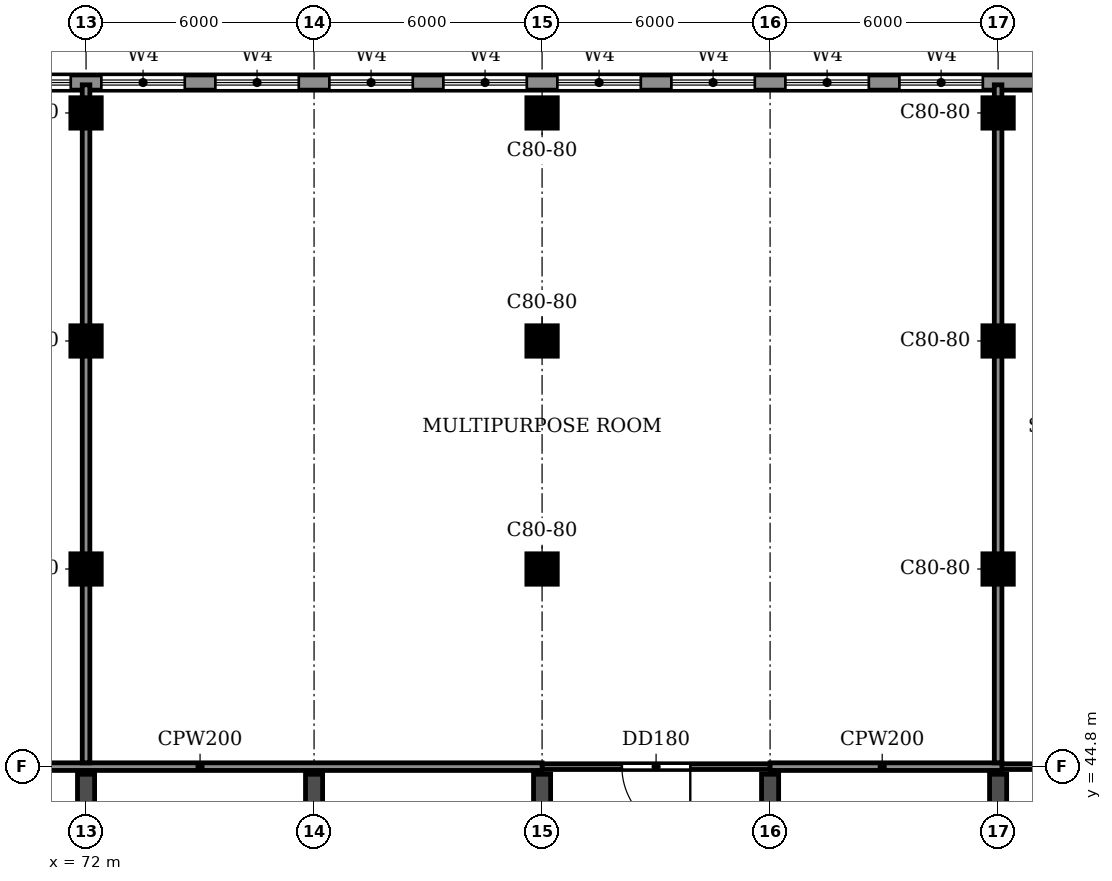
"""IFC4 building model, lengths in metres.
Left out: names, types, materials, properties, quantities, classifications, styles, units other than length and angle.
Written with IfcOpenShell. Run it as: python <this file> out.ifc"""

import sys

from ifc_helpers import new_model, si_unit, direction, frame, frame_2d, origin, origin_2d, place, context, subcontext, project, spatial, rectangle, extrude, source, transform, mapped, element, fill, save


model = new_model("IFC4")
c1 = context("Model", 3, precision=1e-05, world=origin(), true_north=direction((0.0, 1.0)))
c2 = subcontext(c1, "Body", "Model", "MODEL_VIEW")
j1 = project(units=[si_unit("LENGTHUNIT", "METRE"), si_unit("PLANEANGLEUNIT", "RADIAN")], contexts=[c1])
p1 = place(None, origin())
s1 = spatial("IfcSite", under=j1, at=p1, CompositionType="ELEMENT")
p2 = place(p1, origin())
s2 = spatial("IfcBuilding", under=s1, at=p2, CompositionType="ELEMENT")
p3 = place(p2, frame((0.0, 0.0, 10.8)))
s3 = spatial("IfcBuildingStorey", under=s2, at=p3, CompositionType="ELEMENT", Elevation=10.8)
for number, where, z_axis, x_axis in (
    (1, (72.0, 30.55, 0.0), (0.0, 0.0, 1.0), (0.0, 1.0, 0.0)),
    (2, (78.0, 30.55, 0.0), (0.0, 0.0, 1.0), (0.0, 1.0, 0.0)),
    (3, (84.0, 30.55, 0.0), (0.0, 0.0, 1.0), (0.0, 1.0, 0.0)),
    (4, (90.0, 30.55, 0.0), (0.0, 0.0, 1.0), (0.0, 1.0, 0.0)),
    (5, (96.0, 30.55, 0.0), (0.0, 0.0, 1.0), (0.0, 1.0, 0.0)),
):
    element("IfcWall", number, at=place(p3, frame(where, z_axis=z_axis, x_axis=x_axis)), inside=s3, PredefinedType="SHEAR", context=c2, shape_type="SweptSolid", body=[
        extrude(rectangle(XDim=14.05, YDim=0.45, at=frame_2d((7.025, 0.0))), origin(), (0.0, 0.0, 1.0), 3.92),
    ])
m1 = source(origin(), c2, "Body", "SweptSolid", [
    extrude(rectangle(XDim=0.8, YDim=0.8, at=origin_2d()), origin(), (0.0, 0.0, 1.0), 3.92),
])
for number, where, z_axis, x_axis in (
    (6, (72.0, 62.0, 0.0), (0.0, 0.0, 1.0), (1.0, 0.0, 0.0)),
    (7, (84.0, 62.0, 0.0), (0.0, 0.0, 1.0), (1.0, 0.0, 0.0)),
    (8, (96.0, 62.0, 0.0), (0.0, 0.0, 1.0), (1.0, 0.0, 0.0)),
    (9, (72.0, 56.0, 0.0), (0.0, 0.0, 1.0), (1.0, 0.0, 0.0)),
    (10, (84.0, 56.0, 0.0), (0.0, 0.0, 1.0), (1.0, 0.0, 0.0)),
    (11, (96.0, 56.0, 0.0), (0.0, 0.0, 1.0), (1.0, 0.0, 0.0)),
    (12, (72.0, 50.0, 0.0), (0.0, 0.0, 1.0), (1.0, 0.0, 0.0)),
    (13, (84.0, 50.0, 0.0), (0.0, 0.0, 1.0), (1.0, 0.0, 0.0)),
    (14, (96.0, 50.0, 0.0), (0.0, 0.0, 1.0), (1.0, 0.0, 0.0)),
):
    element("IfcColumn", number, at=place(p3, frame(where, z_axis=z_axis, x_axis=x_axis)), inside=s3, PredefinedType="COLUMN", context=c2, shape_type="MappedRepresentation", body=[
        mapped(m1, transform((0.0, 0.0, 0.0))),
    ])
p4 = place(p3, frame((105.0, 62.8, 0.0), z_axis=(0.0, 0.0, 1.0), x_axis=(-1.0, 0.0, 0.0)))
e15 = element("IfcWall", 15, at=p4, inside=s3, PredefinedType="STANDARD", context=c2, shape_type="SweptSolid", body=[
    extrude(rectangle(XDim=108.0, YDim=0.4, at=frame_2d((54.0, 0.0))), origin(), (0.0, 0.0, 1.0), 3.92),
])
p5 = place(p4, frame((102.4, 0.0, 0.9)))
e16 = element("IfcOpeningElement", 16, at=p5, cuts=e15, PredefinedType="OPENING", context=c2, shape_type="SweptSolid", body=[
    extrude(rectangle(XDim=2.2, YDim=2.7, at=frame_2d((1.1, 1.35))), frame((0.0, 0.21, 0.0), z_axis=(0.0, -1.0, 0.0), x_axis=(1.0, 0.0, 0.0)), (0.0, 0.0, 1.0), 0.42),
])
p6 = place(p4, frame((99.4, 0.0, 0.9)))
e17 = element("IfcOpeningElement", 17, at=p6, cuts=e15, PredefinedType="OPENING", context=c2, shape_type="SweptSolid", body=[
    extrude(rectangle(XDim=2.2, YDim=2.7, at=frame_2d((1.1, 1.35))), frame((0.0, 0.21, 0.0), z_axis=(0.0, -1.0, 0.0), x_axis=(1.0, 0.0, 0.0)), (0.0, 0.0, 1.0), 0.42),
])
p7 = place(p4, frame((90.4, 0.0, 0.9)))
e18 = element("IfcOpeningElement", 18, at=p7, cuts=e15, PredefinedType="OPENING", context=c2, shape_type="SweptSolid", body=[
    extrude(rectangle(XDim=2.2, YDim=2.7, at=frame_2d((1.1, 1.35))), frame((0.0, 0.21, 0.0), z_axis=(0.0, -1.0, 0.0), x_axis=(1.0, 0.0, 0.0)), (0.0, 0.0, 1.0), 0.42),
])
p8 = place(p4, frame((87.4, 0.0, 0.9)))
e19 = element("IfcOpeningElement", 19, at=p8, cuts=e15, PredefinedType="OPENING", context=c2, shape_type="SweptSolid", body=[
    extrude(rectangle(XDim=2.2, YDim=2.7, at=frame_2d((1.1, 1.35))), frame((0.0, 0.21, 0.0), z_axis=(0.0, -1.0, 0.0), x_axis=(1.0, 0.0, 0.0)), (0.0, 0.0, 1.0), 0.42),
])
p9 = place(p4, frame((84.4, 0.0, 0.9)))
e20 = element("IfcOpeningElement", 20, at=p9, cuts=e15, PredefinedType="OPENING", context=c2, shape_type="SweptSolid", body=[
    extrude(rectangle(XDim=2.2, YDim=2.7, at=frame_2d((1.1, 1.35))), frame((0.0, 0.21, 0.0), z_axis=(0.0, -1.0, 0.0), x_axis=(1.0, 0.0, 0.0)), (0.0, 0.0, 1.0), 0.42),
])
p10 = place(p4, frame((81.4, 0.0, 0.9)))
e21 = element("IfcOpeningElement", 21, at=p10, cuts=e15, PredefinedType="OPENING", context=c2, shape_type="SweptSolid", body=[
    extrude(rectangle(XDim=2.2, YDim=2.7, at=frame_2d((1.1, 1.35))), frame((0.0, 0.21, 0.0), z_axis=(0.0, -1.0, 0.0), x_axis=(1.0, 0.0, 0.0)), (0.0, 0.0, 1.0), 0.42),
])
p11 = place(p4, frame((78.4, 0.0, 0.9)))
e22 = element("IfcOpeningElement", 22, at=p11, cuts=e15, PredefinedType="OPENING", context=c2, shape_type="SweptSolid", body=[
    extrude(rectangle(XDim=2.2, YDim=2.7, at=frame_2d((1.1, 1.35))), frame((0.0, 0.21, 0.0), z_axis=(0.0, -1.0, 0.0), x_axis=(1.0, 0.0, 0.0)), (0.0, 0.0, 1.0), 0.42),
])
p12 = place(p4, frame((75.4, 0.0, 0.9)))
e23 = element("IfcOpeningElement", 23, at=p12, cuts=e15, PredefinedType="OPENING", context=c2, shape_type="SweptSolid", body=[
    extrude(rectangle(XDim=2.2, YDim=2.7, at=frame_2d((1.1, 1.35))), frame((0.0, 0.21, 0.0), z_axis=(0.0, -1.0, 0.0), x_axis=(1.0, 0.0, 0.0)), (0.0, 0.0, 1.0), 0.42),
])
p13 = place(p4, frame((66.4, 0.0, 0.9)))
e24 = element("IfcOpeningElement", 24, at=p13, cuts=e15, PredefinedType="OPENING", context=c2, shape_type="SweptSolid", body=[
    extrude(rectangle(XDim=2.2, YDim=2.7, at=frame_2d((1.1, 1.35))), frame((0.0, 0.21, 0.0), z_axis=(0.0, -1.0, 0.0), x_axis=(1.0, 0.0, 0.0)), (0.0, 0.0, 1.0), 0.42),
])
p14 = place(p4, frame((63.4, 0.0, 0.9)))
e25 = element("IfcOpeningElement", 25, at=p14, cuts=e15, PredefinedType="OPENING", context=c2, shape_type="SweptSolid", body=[
    extrude(rectangle(XDim=2.2, YDim=2.7, at=frame_2d((1.1, 1.35))), frame((0.0, 0.21, 0.0), z_axis=(0.0, -1.0, 0.0), x_axis=(1.0, 0.0, 0.0)), (0.0, 0.0, 1.0), 0.42),
])
p15 = place(p4, frame((60.4, 0.0, 0.9)))
e26 = element("IfcOpeningElement", 26, at=p15, cuts=e15, PredefinedType="OPENING", context=c2, shape_type="SweptSolid", body=[
    extrude(rectangle(XDim=2.2, YDim=2.7, at=frame_2d((1.1, 1.35))), frame((0.0, 0.21, 0.0), z_axis=(0.0, -1.0, 0.0), x_axis=(1.0, 0.0, 0.0)), (0.0, 0.0, 1.0), 0.42),
])
p16 = place(p4, frame((57.4, 0.0, 0.9)))
e27 = element("IfcOpeningElement", 27, at=p16, cuts=e15, PredefinedType="OPENING", context=c2, shape_type="SweptSolid", body=[
    extrude(rectangle(XDim=2.2, YDim=2.7, at=frame_2d((1.1, 1.35))), frame((0.0, 0.21, 0.0), z_axis=(0.0, -1.0, 0.0), x_axis=(1.0, 0.0, 0.0)), (0.0, 0.0, 1.0), 0.42),
])
p17 = place(p4, frame((54.4, 0.0, 0.9)))
e28 = element("IfcOpeningElement", 28, at=p17, cuts=e15, PredefinedType="OPENING", context=c2, shape_type="SweptSolid", body=[
    extrude(rectangle(XDim=2.2, YDim=2.7, at=frame_2d((1.1, 1.35))), frame((0.0, 0.21, 0.0), z_axis=(0.0, -1.0, 0.0), x_axis=(1.0, 0.0, 0.0)), (0.0, 0.0, 1.0), 0.42),
])
p18 = place(p4, frame((51.4, 0.0, 0.9)))
e29 = element("IfcOpeningElement", 29, at=p18, cuts=e15, PredefinedType="OPENING", context=c2, shape_type="SweptSolid", body=[
    extrude(rectangle(XDim=2.2, YDim=2.7, at=frame_2d((1.1, 1.35))), frame((0.0, 0.21, 0.0), z_axis=(0.0, -1.0, 0.0), x_axis=(1.0, 0.0, 0.0)), (0.0, 0.0, 1.0), 0.42),
])
p19 = place(p4, frame((48.4, 0.0, 0.9)))
e30 = element("IfcOpeningElement", 30, at=p19, cuts=e15, PredefinedType="OPENING", context=c2, shape_type="SweptSolid", body=[
    extrude(rectangle(XDim=2.2, YDim=2.7, at=frame_2d((1.1, 1.35))), frame((0.0, 0.21, 0.0), z_axis=(0.0, -1.0, 0.0), x_axis=(1.0, 0.0, 0.0)), (0.0, 0.0, 1.0), 0.42),
])
p20 = place(p4, frame((45.4, 0.0, 0.9)))
e31 = element("IfcOpeningElement", 31, at=p20, cuts=e15, PredefinedType="OPENING", context=c2, shape_type="SweptSolid", body=[
    extrude(rectangle(XDim=2.2, YDim=2.7, at=frame_2d((1.1, 1.35))), frame((0.0, 0.21, 0.0), z_axis=(0.0, -1.0, 0.0), x_axis=(1.0, 0.0, 0.0)), (0.0, 0.0, 1.0), 0.42),
])
p21 = place(p4, frame((42.4, 0.0, 0.9)))
e32 = element("IfcOpeningElement", 32, at=p21, cuts=e15, PredefinedType="OPENING", context=c2, shape_type="SweptSolid", body=[
    extrude(rectangle(XDim=2.2, YDim=2.7, at=frame_2d((1.1, 1.35))), frame((0.0, 0.21, 0.0), z_axis=(0.0, -1.0, 0.0), x_axis=(1.0, 0.0, 0.0)), (0.0, 0.0, 1.0), 0.42),
])
p22 = place(p4, frame((39.4, 0.0, 0.9)))
e33 = element("IfcOpeningElement", 33, at=p22, cuts=e15, PredefinedType="OPENING", context=c2, shape_type="SweptSolid", body=[
    extrude(rectangle(XDim=2.2, YDim=2.7, at=frame_2d((1.1, 1.35))), frame((0.0, 0.21, 0.0), z_axis=(0.0, -1.0, 0.0), x_axis=(1.0, 0.0, 0.0)), (0.0, 0.0, 1.0), 0.42),
])
p23 = place(p4, frame((36.4, 0.0, 0.9)))
e34 = element("IfcOpeningElement", 34, at=p23, cuts=e15, PredefinedType="OPENING", context=c2, shape_type="SweptSolid", body=[
    extrude(rectangle(XDim=2.2, YDim=2.7, at=frame_2d((1.1, 1.35))), frame((0.0, 0.21, 0.0), z_axis=(0.0, -1.0, 0.0), x_axis=(1.0, 0.0, 0.0)), (0.0, 0.0, 1.0), 0.42),
])
p24 = place(p4, frame((33.4, 0.0, 0.9)))
e35 = element("IfcOpeningElement", 35, at=p24, cuts=e15, PredefinedType="OPENING", context=c2, shape_type="SweptSolid", body=[
    extrude(rectangle(XDim=2.2, YDim=2.7, at=frame_2d((1.1, 1.35))), frame((0.0, 0.21, 0.0), z_axis=(0.0, -1.0, 0.0), x_axis=(1.0, 0.0, 0.0)), (0.0, 0.0, 1.0), 0.42),
])
p25 = place(p4, frame((30.4, 0.0, 0.9)))
e36 = element("IfcOpeningElement", 36, at=p25, cuts=e15, PredefinedType="OPENING", context=c2, shape_type="SweptSolid", body=[
    extrude(rectangle(XDim=2.2, YDim=2.7, at=frame_2d((1.1, 1.35))), frame((0.0, 0.21, 0.0), z_axis=(0.0, -1.0, 0.0), x_axis=(1.0, 0.0, 0.0)), (0.0, 0.0, 1.0), 0.42),
])
p26 = place(p4, frame((27.4, 0.0, 0.9)))
e37 = element("IfcOpeningElement", 37, at=p26, cuts=e15, PredefinedType="OPENING", context=c2, shape_type="SweptSolid", body=[
    extrude(rectangle(XDim=2.2, YDim=2.7, at=frame_2d((1.1, 1.35))), frame((0.0, 0.21, 0.0), z_axis=(0.0, -1.0, 0.0), x_axis=(1.0, 0.0, 0.0)), (0.0, 0.0, 1.0), 0.42),
])
p27 = place(p4, frame((24.4, 0.0, 0.9)))
e38 = element("IfcOpeningElement", 38, at=p27, cuts=e15, PredefinedType="OPENING", context=c2, shape_type="SweptSolid", body=[
    extrude(rectangle(XDim=2.2, YDim=2.7, at=frame_2d((1.1, 1.35))), frame((0.0, 0.21, 0.0), z_axis=(0.0, -1.0, 0.0), x_axis=(1.0, 0.0, 0.0)), (0.0, 0.0, 1.0), 0.42),
])
p28 = place(p4, frame((21.4, 0.0, 0.9)))
e39 = element("IfcOpeningElement", 39, at=p28, cuts=e15, PredefinedType="OPENING", context=c2, shape_type="SweptSolid", body=[
    extrude(rectangle(XDim=2.2, YDim=2.7, at=frame_2d((1.1, 1.35))), frame((0.0, 0.21, 0.0), z_axis=(0.0, -1.0, 0.0), x_axis=(1.0, 0.0, 0.0)), (0.0, 0.0, 1.0), 0.42),
])
p29 = place(p4, frame((18.4, 0.0, 0.9)))
e40 = element("IfcOpeningElement", 40, at=p29, cuts=e15, PredefinedType="OPENING", context=c2, shape_type="SweptSolid", body=[
    extrude(rectangle(XDim=2.2, YDim=2.7, at=frame_2d((1.1, 1.35))), frame((0.0, 0.21, 0.0), z_axis=(0.0, -1.0, 0.0), x_axis=(1.0, 0.0, 0.0)), (0.0, 0.0, 1.0), 0.42),
])
p30 = place(p4, frame((15.4, 0.0, 0.9)))
e41 = element("IfcOpeningElement", 41, at=p30, cuts=e15, PredefinedType="OPENING", context=c2, shape_type="SweptSolid", body=[
    extrude(rectangle(XDim=2.2, YDim=2.7, at=frame_2d((1.1, 1.35))), frame((0.0, 0.21, 0.0), z_axis=(0.0, -1.0, 0.0), x_axis=(1.0, 0.0, 0.0)), (0.0, 0.0, 1.0), 0.42),
])
p31 = place(p4, frame((12.4, 0.0, 0.9)))
e42 = element("IfcOpeningElement", 42, at=p31, cuts=e15, PredefinedType="OPENING", context=c2, shape_type="SweptSolid", body=[
    extrude(rectangle(XDim=2.2, YDim=2.7, at=frame_2d((1.1, 1.35))), frame((0.0, 0.21, 0.0), z_axis=(0.0, -1.0, 0.0), x_axis=(1.0, 0.0, 0.0)), (0.0, 0.0, 1.0), 0.42),
])
p32 = place(p4, frame((9.4, 0.0, 0.9)))
e43 = element("IfcOpeningElement", 43, at=p32, cuts=e15, PredefinedType="OPENING", context=c2, shape_type="SweptSolid", body=[
    extrude(rectangle(XDim=2.2, YDim=2.7, at=frame_2d((1.1, 1.35))), frame((0.0, 0.21, 0.0), z_axis=(0.0, -1.0, 0.0), x_axis=(1.0, 0.0, 0.0)), (0.0, 0.0, 1.0), 0.42),
])
p33 = place(p4, frame((93.8, 0.0, 0.0)))
e44 = element("IfcOpeningElement", 44, at=p33, cuts=e15, PredefinedType="OPENING", context=c2, shape_type="SweptSolid", body=[
    extrude(rectangle(XDim=2.0, YDim=2.4, at=frame_2d((1.0, 1.2))), frame((0.0, 0.21, 0.0), z_axis=(0.0, -1.0, 0.0), x_axis=(1.0, 0.0, 0.0)), (0.0, 0.0, 1.0), 0.42),
])
p34 = place(p4, frame((71.63, 0.0, 0.0)))
e45 = element("IfcOpeningElement", 45, at=p34, cuts=e15, PredefinedType="OPENING", context=c2, shape_type="SweptSolid", body=[
    extrude(rectangle(XDim=2.0, YDim=2.4, at=frame_2d((1.0, 1.2))), frame((0.0, 0.21, 0.0), z_axis=(0.0, -1.0, 0.0), x_axis=(1.0, 0.0, 0.0)), (0.0, 0.0, 1.0), 0.42),
])
p35 = place(p3, frame((84.0, 44.8, 0.0), z_axis=(0.0, 0.0, 1.0), x_axis=(1.0, 0.0, 0.0)))
e46 = element("IfcWall", 46, at=p35, inside=s3, PredefinedType="PARTITIONING", context=c2, shape_type="SweptSolid", body=[
    extrude(rectangle(XDim=6.0, YDim=0.15, at=frame_2d((3.0, 0.0))), origin(), (0.0, 0.0, 1.0), 3.92),
])
p36 = place(p35, frame((2.1, 0.0, 0.0)))
e47 = element("IfcOpeningElement", 47, at=p36, cuts=e46, PredefinedType="OPENING", context=c2, shape_type="SweptSolid", body=[
    extrude(rectangle(XDim=1.8, YDim=2.1, at=frame_2d((0.9, 1.05))), frame((0.0, 0.085, 0.0), z_axis=(0.0, -1.0, 0.0), x_axis=(1.0, 0.0, 0.0)), (0.0, 0.0, 1.0), 0.17),
])
p37 = place(p3, frame((95.9, 44.8, 0.0), z_axis=(0.0, 0.0, 1.0), x_axis=(1.0, 0.0, 0.0)))
e48 = element("IfcWall", 48, at=p37, inside=s3, PredefinedType="PARTITIONING", context=c2, shape_type="SweptSolid", body=[
    extrude(rectangle(XDim=6.1, YDim=0.15, at=frame_2d((3.05, 0.0))), origin(), (0.0, 0.0, 1.0), 3.92),
])
p38 = place(p37, frame((2.7, 0.0, 0.0)))
e49 = element("IfcOpeningElement", 49, at=p38, cuts=e48, PredefinedType="OPENING", context=c2, shape_type="SweptSolid", body=[
    extrude(rectangle(XDim=0.8, YDim=2.1, at=frame_2d((0.4, 1.05))), frame((0.0, 0.085, 0.0), z_axis=(0.0, -1.0, 0.0), x_axis=(1.0, 0.0, 0.0)), (0.0, 0.0, 1.0), 0.17),
])
p39 = place(p3, frame((66.0, 44.8, 0.0), z_axis=(0.0, 0.0, 1.0), x_axis=(1.0, 0.0, 0.0)))
e50 = element("IfcWall", 50, at=p39, inside=s3, PredefinedType="PARTITIONING", context=c2, shape_type="SweptSolid", body=[
    extrude(rectangle(XDim=18.0, YDim=0.2, at=frame_2d((9.0, 0.0))), origin(), (0.0, 0.0, 1.0), 3.92),
])
p40 = place(p3, frame((90.0, 44.8, 0.0), z_axis=(0.0, 0.0, 1.0), x_axis=(1.0, 0.0, 0.0)))
e51 = element("IfcWall", 51, at=p40, inside=s3, PredefinedType="PARTITIONING", context=c2, shape_type="SweptSolid", body=[
    extrude(rectangle(XDim=6.1, YDim=0.2, at=frame_2d((3.05, 0.0))), origin(), (0.0, 0.0, 1.0), 3.92),
])
for number, where, z_axis, x_axis in (
    (52, (72.0, 44.9, 0.0), (0.0, 0.0, 1.0), (0.0, 1.0, 0.0)),
    (53, (96.0, 44.9, 0.0), (0.0, 0.0, 1.0), (0.0, 1.0, 0.0)),
):
    element("IfcWall", number, at=place(p3, frame(where, z_axis=z_axis, x_axis=x_axis)), inside=s3, PredefinedType="PARTITIONING", context=c2, shape_type="SweptSolid", body=[
        extrude(rectangle(XDim=17.84, YDim=0.2, at=frame_2d((8.92, 0.0))), origin(), (0.0, 0.0, 1.0), 3.92),
    ])
p41 = place(p24, origin())
e54 = element("IfcWindow", 54, at=p41, inside=s3, PartitioningType="DOUBLE_PANEL_HORIZONTAL", PredefinedType="WINDOW", context=c2, shape_type="SweptSolid", body=[
    extrude(rectangle(XDim=2.2, YDim=2.7, at=frame_2d((1.1, 1.35))), frame((0.0, 0.03, 0.0), z_axis=(0.0, -1.0, 0.0), x_axis=(1.0, 0.0, 0.0)), (0.0, 0.0, 1.0), 0.06),
])
fill(e35, e54)
p42 = place(p25, origin())
e55 = element("IfcWindow", 55, at=p42, inside=s3, PartitioningType="DOUBLE_PANEL_HORIZONTAL", PredefinedType="WINDOW", context=c2, shape_type="SweptSolid", body=[
    extrude(rectangle(XDim=2.2, YDim=2.7, at=frame_2d((1.1, 1.35))), frame((0.0, 0.03, 0.0), z_axis=(0.0, -1.0, 0.0), x_axis=(1.0, 0.0, 0.0)), (0.0, 0.0, 1.0), 0.06),
])
fill(e36, e55)
p43 = place(p26, origin())
e56 = element("IfcWindow", 56, at=p43, inside=s3, PartitioningType="DOUBLE_PANEL_HORIZONTAL", PredefinedType="WINDOW", context=c2, shape_type="SweptSolid", body=[
    extrude(rectangle(XDim=2.2, YDim=2.7, at=frame_2d((1.1, 1.35))), frame((0.0, 0.03, 0.0), z_axis=(0.0, -1.0, 0.0), x_axis=(1.0, 0.0, 0.0)), (0.0, 0.0, 1.0), 0.06),
])
fill(e37, e56)
p44 = place(p27, origin())
e57 = element("IfcWindow", 57, at=p44, inside=s3, PartitioningType="DOUBLE_PANEL_HORIZONTAL", PredefinedType="WINDOW", context=c2, shape_type="SweptSolid", body=[
    extrude(rectangle(XDim=2.2, YDim=2.7, at=frame_2d((1.1, 1.35))), frame((0.0, 0.03, 0.0), z_axis=(0.0, -1.0, 0.0), x_axis=(1.0, 0.0, 0.0)), (0.0, 0.0, 1.0), 0.06),
])
fill(e38, e57)
p45 = place(p28, origin())
e58 = element("IfcWindow", 58, at=p45, inside=s3, PartitioningType="DOUBLE_PANEL_HORIZONTAL", PredefinedType="WINDOW", context=c2, shape_type="SweptSolid", body=[
    extrude(rectangle(XDim=2.2, YDim=2.7, at=frame_2d((1.1, 1.35))), frame((0.0, 0.03, 0.0), z_axis=(0.0, -1.0, 0.0), x_axis=(1.0, 0.0, 0.0)), (0.0, 0.0, 1.0), 0.06),
])
fill(e39, e58)
p46 = place(p29, origin())
e59 = element("IfcWindow", 59, at=p46, inside=s3, PartitioningType="DOUBLE_PANEL_HORIZONTAL", PredefinedType="WINDOW", context=c2, shape_type="SweptSolid", body=[
    extrude(rectangle(XDim=2.2, YDim=2.7, at=frame_2d((1.1, 1.35))), frame((0.0, 0.03, 0.0), z_axis=(0.0, -1.0, 0.0), x_axis=(1.0, 0.0, 0.0)), (0.0, 0.0, 1.0), 0.06),
])
fill(e40, e59)
p47 = place(p30, origin())
e60 = element("IfcWindow", 60, at=p47, inside=s3, PartitioningType="DOUBLE_PANEL_HORIZONTAL", PredefinedType="WINDOW", context=c2, shape_type="SweptSolid", body=[
    extrude(rectangle(XDim=2.2, YDim=2.7, at=frame_2d((1.1, 1.35))), frame((0.0, 0.03, 0.0), z_axis=(0.0, -1.0, 0.0), x_axis=(1.0, 0.0, 0.0)), (0.0, 0.0, 1.0), 0.06),
])
fill(e41, e60)
p48 = place(p31, origin())
e61 = element("IfcWindow", 61, at=p48, inside=s3, PartitioningType="DOUBLE_PANEL_HORIZONTAL", PredefinedType="WINDOW", context=c2, shape_type="SweptSolid", body=[
    extrude(rectangle(XDim=2.2, YDim=2.7, at=frame_2d((1.1, 1.35))), frame((0.0, 0.03, 0.0), z_axis=(0.0, -1.0, 0.0), x_axis=(1.0, 0.0, 0.0)), (0.0, 0.0, 1.0), 0.06),
])
fill(e42, e61)
p49 = place(p32, origin())
e62 = element("IfcWindow", 62, at=p49, inside=s3, PartitioningType="DOUBLE_PANEL_HORIZONTAL", PredefinedType="WINDOW", context=c2, shape_type="SweptSolid", body=[
    extrude(rectangle(XDim=2.2, YDim=2.7, at=frame_2d((1.1, 1.35))), frame((0.0, 0.03, 0.0), z_axis=(0.0, -1.0, 0.0), x_axis=(1.0, 0.0, 0.0)), (0.0, 0.0, 1.0), 0.06),
])
fill(e43, e62)
p50 = place(p36, frame((1.8, 0.0, 0.0), z_axis=(0.0, 0.0, 1.0), x_axis=(-1.0, 0.0, 0.0)))
e63 = element("IfcDoor", 63, at=p50, inside=s3, OperationType="DOUBLE_DOOR_SINGLE_SWING", PredefinedType="DOOR", context=c2, shape_type="SweptSolid", body=[
    extrude(rectangle(XDim=1.8, YDim=2.1, at=frame_2d((0.9, 1.05))), frame((0.0, 0.025, 0.0), z_axis=(0.0, -1.0, 0.0), x_axis=(1.0, 0.0, 0.0)), (0.0, 0.0, 1.0), 0.05),
])
fill(e47, e63)
save(model, sys.argv[1])
